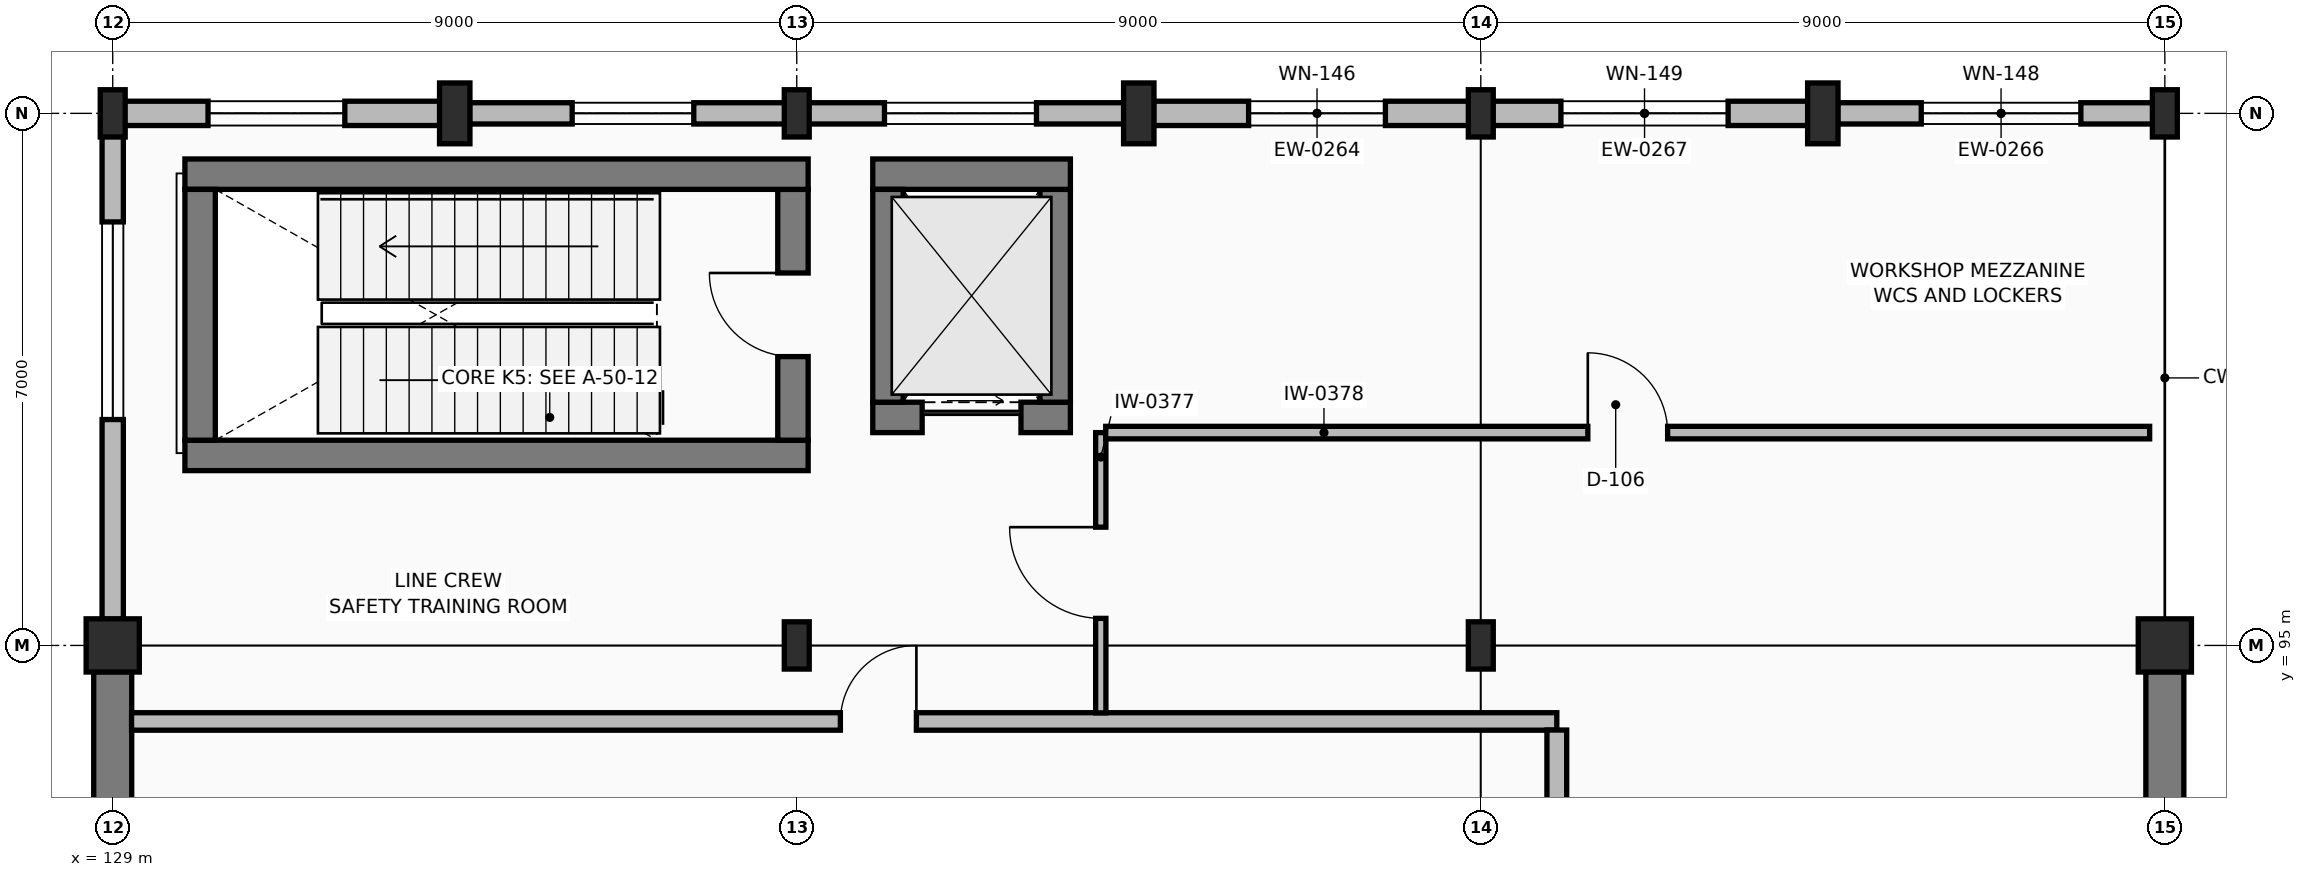
"""IFC4 building model, lengths in metres.
Left out: names, types, materials, properties, quantities, classifications, styles, units other than length and angle.
Written with IfcOpenShell. Run it as: python <this file> out.ifc"""

import sys

from ifc_helpers import new_model, si_unit, direction, frame, frame_2d, origin, origin_2d, place, context, subcontext, project, spatial, rectangle, i_section, extrude, element, fill, save


model = new_model("IFC4")
c1 = context("Model", 3, precision=1e-05, world=origin(), true_north=direction((0.0, 1.0)))
c2 = subcontext(c1, "Body", "Model", "MODEL_VIEW")
j1 = project(units=[si_unit("LENGTHUNIT", "METRE"), si_unit("PLANEANGLEUNIT", "RADIAN")], contexts=[c1])
p1 = place(None, origin())
s1 = spatial("IfcSite", under=j1, at=p1, CompositionType="ELEMENT")
p2 = place(p1, origin())
s2 = spatial("IfcBuilding", under=s1, at=p2, CompositionType="ELEMENT")
p3 = place(p2, frame((0.0, 0.0, 4.8)))
s3 = spatial("IfcBuildingStorey", under=s2, at=p3, CompositionType="ELEMENT", Elevation=4.8)
p4 = place(p3, frame((129.0, 95.0, 0.0), z_axis=(0.0, 0.0, 1.0), x_axis=(1.0, 0.0, 0.0)))
e1 = element("IfcColumn", 1, at=p4, inside=s3, PredefinedType="COLUMN", context=c2, shape_type="SweptSolid", body=[
    extrude(rectangle(XDim=0.7, YDim=0.7, at=origin_2d()), origin(), (0.0, 0.0, 1.0), 4.8),
])
for number, where, z_axis, x_axis in (
    (2, (129.0, 102.0, 0.0), (0.0, 0.0, 1.0), (1.0, 0.0, 0.0)),
    (3, (138.0, 95.0, 0.0), (0.0, 0.0, 1.0), (1.0, 0.0, 0.0)),
    (4, (138.0, 102.0, 0.0), (0.0, 0.0, 1.0), (1.0, 0.0, 0.0)),
    (5, (147.0, 95.0, 0.0), (0.0, 0.0, 1.0), (1.0, 0.0, 0.0)),
    (6, (147.0, 102.0, 0.0), (0.0, 0.0, 1.0), (1.0, 0.0, 0.0)),
):
    element("IfcColumn", number, at=place(p3, frame(where, z_axis=z_axis, x_axis=x_axis)), inside=s3, PredefinedType="COLUMN", context=c2, shape_type="SweptSolid", body=[
        extrude(i_section(OverallWidth=0.328, OverallDepth=0.622, WebThickness=0.015, FlangeThickness=0.024, at=origin_2d()), origin(), (0.0, 0.0, 1.0), 4.8),
    ])
p5 = place(p3, frame((156.0, 95.0, 0.0), z_axis=(0.0, 0.0, 1.0), x_axis=(1.0, 0.0, 0.0)))
e7 = element("IfcColumn", 7, at=p5, inside=s3, PredefinedType="COLUMN", context=c2, shape_type="SweptSolid", body=[
    extrude(rectangle(XDim=0.7, YDim=0.7, at=origin_2d()), origin(), (0.0, 0.0, 1.0), 4.8),
])
p6 = place(p3, frame((156.0, 102.0, 0.0), z_axis=(0.0, 0.0, 1.0), x_axis=(1.0, 0.0, 0.0)))
e8 = element("IfcColumn", 8, at=p6, inside=s3, PredefinedType="COLUMN", context=c2, shape_type="SweptSolid", body=[
    extrude(i_section(OverallWidth=0.328, OverallDepth=0.622, WebThickness=0.015, FlangeThickness=0.024, at=origin_2d()), origin(), (0.0, 0.0, 1.0), 4.8),
])
for number, where, z_axis, x_axis in (
    (9, (133.5, 102.0, 0.0), (0.0, 0.0, 1.0), (1.0, 0.0, 0.0)),
    (10, (142.5, 102.0, 0.0), (0.0, 0.0, 1.0), (1.0, 0.0, 0.0)),
    (11, (151.5, 102.0, 0.0), (0.0, 0.0, 1.0), (1.0, 0.0, 0.0)),
):
    element("IfcColumn", number, at=place(p3, frame(where, z_axis=z_axis, x_axis=x_axis)), inside=s3, PredefinedType="PILASTER", context=c2, shape_type="SweptSolid", body=[
        extrude(rectangle(XDim=0.4, YDim=0.8, at=origin_2d()), origin(), (0.0, 0.0, 1.0), 4.8),
    ])
p7 = place(p3, frame((156.0, 86.345, 0.0), z_axis=(0.0, 0.0, 1.0), x_axis=(0.0, 1.0, 0.0)))
e12 = element("IfcWall", 12, at=p7, inside=s3, PredefinedType="SHEAR", context=c2, shape_type="SweptSolid", body=[
    extrude(rectangle(XDim=8.31, YDim=0.5, at=frame_2d((4.155, 0.0))), origin(), (0.0, 0.0, 1.0), 3.708),
])
p8 = place(p3, frame((137.996, 102.0, 0.0), z_axis=(0.0, 0.0, 1.0), x_axis=(-1.0, 0.0, 0.0)))
e13 = element("IfcWall", 13, at=p8, inside=s3, PredefinedType="SOLIDWALL", context=c2, shape_type="SweptSolid", body=[
    extrude(rectangle(XDim=4.301, YDim=0.28, at=frame_2d((2.15, 0.0))), origin(), (0.0, 0.0, 1.0), 4.17),
])
p9 = place(p8, frame((1.351, 0.0, 0.9)))
e14 = element("IfcOpeningElement", 14, at=p9, cuts=e13, PredefinedType="OPENING", context=c2, shape_type="SweptSolid", body=[
    extrude(rectangle(XDim=1.6, YDim=1.55, at=frame_2d((0.8, 0.775))), frame((0.0, 0.15, 0.0), z_axis=(0.0, -1.0, 0.0), x_axis=(1.0, 0.0, 0.0)), (0.0, 0.0, 1.0), 0.3),
])
p10 = place(p3, frame((133.305, 102.0, 0.0), z_axis=(0.0, 0.0, 1.0), x_axis=(-1.0, 0.0, 0.0)))
e15 = element("IfcWall", 15, at=p10, inside=s3, PredefinedType="SOLIDWALL", context=c2, shape_type="SweptSolid", body=[
    extrude(rectangle(XDim=4.301, YDim=0.32, at=frame_2d((2.15, 0.0))), origin(), (0.0, 0.0, 1.0), 4.17),
])
p11 = place(p10, frame((1.251, 0.0, 0.9)))
e16 = element("IfcOpeningElement", 16, at=p11, cuts=e15, PredefinedType="OPENING", context=c2, shape_type="SweptSolid", body=[
    extrude(rectangle(XDim=1.8, YDim=1.5, at=frame_2d((0.9, 0.75))), frame((0.0, 0.17, 0.0), z_axis=(0.0, -1.0, 0.0), x_axis=(1.0, 0.0, 0.0)), (0.0, 0.0, 1.0), 0.34),
])
p12 = place(p3, frame((146.996, 102.0, 0.0), z_axis=(0.0, 0.0, 1.0), x_axis=(-1.0, 0.0, 0.0)))
e17 = element("IfcWall", 17, at=p12, inside=s3, PredefinedType="SOLIDWALL", context=c2, shape_type="SweptSolid", body=[
    extrude(rectangle(XDim=4.301, YDim=0.32, at=frame_2d((2.15, 0.0))), origin(), (0.0, 0.0, 1.0), 4.17),
])
p13 = place(p12, frame((1.251, 0.0, 0.9)))
e18 = element("IfcOpeningElement", 18, at=p13, cuts=e17, PredefinedType="OPENING", context=c2, shape_type="SweptSolid", body=[
    extrude(rectangle(XDim=1.8, YDim=1.6, at=frame_2d((0.9, 0.8))), frame((0.0, 0.17, 0.0), z_axis=(0.0, -1.0, 0.0), x_axis=(1.0, 0.0, 0.0)), (0.0, 0.0, 1.0), 0.34),
])
p14 = place(p3, frame((142.305, 102.0, 0.0), z_axis=(0.0, 0.0, 1.0), x_axis=(-1.0, 0.0, 0.0)))
e19 = element("IfcWall", 19, at=p14, inside=s3, PredefinedType="SOLIDWALL", context=c2, shape_type="SweptSolid", body=[
    extrude(rectangle(XDim=4.301, YDim=0.28, at=frame_2d((2.15, 0.0))), origin(), (0.0, 0.0, 1.0), 4.17),
])
p15 = place(p14, frame((1.151, 0.0, 0.9)))
e20 = element("IfcOpeningElement", 20, at=p15, cuts=e19, PredefinedType="OPENING", context=c2, shape_type="SweptSolid", body=[
    extrude(rectangle(XDim=2.0, YDim=1.5, at=frame_2d((1.0, 0.75))), frame((0.0, 0.15, 0.0), z_axis=(0.0, -1.0, 0.0), x_axis=(1.0, 0.0, 0.0)), (0.0, 0.0, 1.0), 0.3),
])
p16 = place(p3, frame((155.996, 102.0, 0.0), z_axis=(0.0, 0.0, 1.0), x_axis=(-1.0, 0.0, 0.0)))
e21 = element("IfcWall", 21, at=p16, inside=s3, PredefinedType="SOLIDWALL", context=c2, shape_type="SweptSolid", body=[
    extrude(rectangle(XDim=4.301, YDim=0.28, at=frame_2d((2.15, 0.0))), origin(), (0.0, 0.0, 1.0), 4.17),
])
p17 = place(p16, frame((1.101, 0.0, 0.9)))
e22 = element("IfcOpeningElement", 22, at=p17, cuts=e21, PredefinedType="OPENING", context=c2, shape_type="SweptSolid", body=[
    extrude(rectangle(XDim=2.1, YDim=1.55, at=frame_2d((1.05, 0.775))), frame((0.0, 0.15, 0.0), z_axis=(0.0, -1.0, 0.0), x_axis=(1.0, 0.0, 0.0)), (0.0, 0.0, 1.0), 0.3),
])
p18 = place(p3, frame((151.305, 102.0, 0.0), z_axis=(0.0, 0.0, 1.0), x_axis=(-1.0, 0.0, 0.0)))
e23 = element("IfcWall", 23, at=p18, inside=s3, PredefinedType="SOLIDWALL", context=c2, shape_type="SweptSolid", body=[
    extrude(rectangle(XDim=4.301, YDim=0.32, at=frame_2d((2.15, 0.0))), origin(), (0.0, 0.0, 1.0), 4.17),
])
p19 = place(p18, frame((1.051, 0.0, 0.9)))
e24 = element("IfcOpeningElement", 24, at=p19, cuts=e23, PredefinedType="OPENING", context=c2, shape_type="SweptSolid", body=[
    extrude(rectangle(XDim=2.2, YDim=1.4, at=frame_2d((1.1, 0.7))), frame((0.0, 0.17, 0.0), z_axis=(0.0, -1.0, 0.0), x_axis=(1.0, 0.0, 0.0)), (0.0, 0.0, 1.0), 0.34),
])
p20 = place(p3, frame((129.0, 94.655, 0.0), z_axis=(0.0, 0.0, 1.0), x_axis=(0.0, -1.0, 0.0)))
e25 = element("IfcWall", 25, at=p20, inside=s3, PredefinedType="SHEAR", context=c2, shape_type="SweptSolid", body=[
    extrude(rectangle(XDim=3.96, YDim=0.5, at=frame_2d((1.98, 0.0))), origin(), (0.0, 0.0, 1.0), 2.648),
])
p21 = place(p3, frame((129.0, 101.699, 0.0), z_axis=(0.0, 0.0, 1.0), x_axis=(0.0, -1.0, 0.0)))
e26 = element("IfcWall", 26, at=p21, inside=s3, PredefinedType="SOLIDWALL", context=c2, shape_type="SweptSolid", body=[
    extrude(rectangle(XDim=6.354, YDim=0.28, at=frame_2d((3.177, 0.0))), origin(), (0.0, 0.0, 1.0), 4.17),
])
p22 = place(p21, frame((1.127, 0.0, 0.9)))
e27 = element("IfcOpeningElement", 27, at=p22, cuts=e26, PredefinedType="OPENING", context=c2, shape_type="SweptSolid", body=[
    extrude(rectangle(XDim=2.6, YDim=1.55, at=frame_2d((1.3, 0.775))), frame((0.0, 0.15, 0.0), z_axis=(0.0, -1.0, 0.0), x_axis=(1.0, 0.0, 0.0)), (0.0, 0.0, 1.0), 0.3),
])
p23 = place(p3, frame((129.95, 97.5, 0.0), z_axis=(0.0, 0.0, 1.0), x_axis=(1.0, 0.0, 0.0)))
e28 = element("IfcWall", 28, at=p23, inside=s3, PredefinedType="SHEAR", context=c2, shape_type="SweptSolid", body=[
    extrude(rectangle(XDim=8.2, YDim=0.4, at=frame_2d((4.1, 0.0))), origin(), (0.0, 0.0, 1.0), 4.49),
])
p24 = place(p3, frame((137.95, 97.7, 0.0), z_axis=(0.0, 0.0, 1.0), x_axis=(0.0, 1.0, 0.0)))
e29 = element("IfcWall", 29, at=p24, inside=s3, PredefinedType="SHEAR", context=c2, shape_type="SweptSolid", body=[
    extrude(rectangle(XDim=3.3, YDim=0.4, at=frame_2d((1.65, 0.0))), origin(), (0.0, 0.0, 1.0), 4.49),
])
p25 = place(p24, frame((1.1, 0.0, 0.0)))
e30 = element("IfcOpeningElement", 30, at=p25, cuts=e29, PredefinedType="OPENING", context=c2, shape_type="SweptSolid", body=[
    extrude(rectangle(XDim=1.1, YDim=2.2, at=frame_2d((0.55, 1.1))), frame((0.0, 0.21, 0.0), z_axis=(0.0, -1.0, 0.0), x_axis=(1.0, 0.0, 0.0)), (0.0, 0.0, 1.0), 0.42),
])
p26 = place(p3, frame((138.15, 101.2, 0.0), z_axis=(0.0, 0.0, 1.0), x_axis=(-1.0, 0.0, 0.0)))
e31 = element("IfcWall", 31, at=p26, inside=s3, PredefinedType="SHEAR", context=c2, shape_type="SweptSolid", body=[
    extrude(rectangle(XDim=8.2, YDim=0.4, at=frame_2d((4.1, 0.0))), origin(), (0.0, 0.0, 1.0), 4.49),
])
p27 = place(p3, frame((130.15, 101.0, 0.0), z_axis=(0.0, 0.0, 1.0), x_axis=(0.0, -1.0, 0.0)))
e32 = element("IfcWall", 32, at=p27, inside=s3, PredefinedType="SHEAR", context=c2, shape_type="SweptSolid", body=[
    extrude(rectangle(XDim=3.3, YDim=0.4, at=frame_2d((1.65, 0.0))), origin(), (0.0, 0.0, 1.0), 4.49),
])
p28 = place(p3, frame((139.0, 98.0, 0.0), z_axis=(0.0, 0.0, 1.0), x_axis=(1.0, 0.0, 0.0)))
e33 = element("IfcWall", 33, at=p28, inside=s3, PredefinedType="SHEAR", context=c2, shape_type="SweptSolid", body=[
    extrude(rectangle(XDim=2.6, YDim=0.4, at=frame_2d((1.3, 0.0))), origin(), (0.0, 0.0, 1.0), 4.49),
])
p29 = place(p28, frame((0.65, 0.0, 0.0)))
e34 = element("IfcOpeningElement", 34, at=p29, cuts=e33, PredefinedType="OPENING", context=c2, shape_type="SweptSolid", body=[
    extrude(rectangle(XDim=1.3, YDim=2.25, at=frame_2d((0.65, 1.125))), frame((0.0, 0.21, 0.0), z_axis=(0.0, -1.0, 0.0), x_axis=(1.0, 0.0, 0.0)), (0.0, 0.0, 1.0), 0.42),
])
p30 = place(p3, frame((141.4, 98.2, 0.0), z_axis=(0.0, 0.0, 1.0), x_axis=(0.0, 1.0, 0.0)))
e35 = element("IfcWall", 35, at=p30, inside=s3, PredefinedType="SHEAR", context=c2, shape_type="SweptSolid", body=[
    extrude(rectangle(XDim=2.8, YDim=0.4, at=frame_2d((1.4, 0.0))), origin(), (0.0, 0.0, 1.0), 4.49),
])
p31 = place(p3, frame((141.6, 101.2, 0.0), z_axis=(0.0, 0.0, 1.0), x_axis=(-1.0, 0.0, 0.0)))
e36 = element("IfcWall", 36, at=p31, inside=s3, PredefinedType="SHEAR", context=c2, shape_type="SweptSolid", body=[
    extrude(rectangle(XDim=2.6, YDim=0.4, at=frame_2d((1.3, 0.0))), origin(), (0.0, 0.0, 1.0), 4.49),
])
p32 = place(p3, frame((139.2, 101.0, 0.0), z_axis=(0.0, 0.0, 1.0), x_axis=(0.0, -1.0, 0.0)))
e37 = element("IfcWall", 37, at=p32, inside=s3, PredefinedType="SHEAR", context=c2, shape_type="SweptSolid", body=[
    extrude(rectangle(XDim=2.8, YDim=0.4, at=frame_2d((1.4, 0.0))), origin(), (0.0, 0.0, 1.0), 4.49),
])
p33 = place(p3, frame((129.248, 94.0, 0.0), z_axis=(0.0, 0.0, 1.0), x_axis=(1.0, 0.0, 0.0)))
e38 = element("IfcWall", 38, at=p33, inside=s3, PredefinedType="PARTITIONING", context=c2, shape_type="SweptSolid", body=[
    extrude(rectangle(XDim=18.752, YDim=0.23, at=frame_2d((9.376, 0.0))), origin(), (0.0, 0.0, 1.0), 3.698),
])
p34 = place(p33, frame((9.326, 0.0, 0.0)))
e39 = element("IfcOpeningElement", 39, at=p34, cuts=e38, PredefinedType="OPENING", context=c2, shape_type="SweptSolid", body=[
    extrude(rectangle(XDim=1.0, YDim=2.15, at=frame_2d((0.5, 1.075))), frame((0.0, 0.125, 0.0), z_axis=(0.0, -1.0, 0.0), x_axis=(1.0, 0.0, 0.0)), (0.0, 0.0, 1.0), 0.25),
])
p35 = place(p3, frame((148.0, 77.2, 0.0), z_axis=(0.0, 0.0, 1.0), x_axis=(0.0, 1.0, 0.0)))
e40 = element("IfcWall", 40, at=p35, inside=s3, PredefinedType="PARTITIONING", context=c2, shape_type="SweptSolid", body=[
    extrude(rectangle(XDim=16.687, YDim=0.26, at=frame_2d((8.344, 0.0))), origin(), (0.0, 0.0, 1.0), 3.698),
])
p36 = place(p35, frame((7.393, 0.0, 0.0)))
e41 = element("IfcOpeningElement", 41, at=p36, cuts=e40, PredefinedType="OPENING", context=c2, shape_type="SweptSolid", body=[
    extrude(rectangle(XDim=1.0, YDim=2.15, at=frame_2d((0.5, 1.075))), frame((0.0, 0.14, 0.0), z_axis=(0.0, -1.0, 0.0), x_axis=(1.0, 0.0, 0.0)), (0.0, 0.0, 1.0), 0.28),
])
p37 = place(p3, frame((142.0, 94.113, 0.0), z_axis=(0.0, 0.0, 1.0), x_axis=(0.0, 1.0, 0.0)))
e42 = element("IfcWall", 42, at=p37, inside=s3, PredefinedType="PARTITIONING", context=c2, shape_type="SweptSolid", body=[
    extrude(rectangle(XDim=3.687, YDim=0.135, at=frame_2d((1.844, 0.0))), origin(), (0.0, 0.0, 1.0), 3.698),
])
p38 = place(p37, frame((1.243, 0.0, 0.0)))
e43 = element("IfcOpeningElement", 43, at=p38, cuts=e42, PredefinedType="OPENING", context=c2, shape_type="SweptSolid", body=[
    extrude(rectangle(XDim=1.2, YDim=2.2, at=frame_2d((0.6, 1.1))), frame((0.0, 0.077, 0.0), z_axis=(0.0, -1.0, 0.0), x_axis=(1.0, 0.0, 0.0)), (0.0, 0.0, 1.0), 0.155),
])
p39 = place(p3, frame((142.065, 97.8, 0.0), z_axis=(0.0, 0.0, 1.0), x_axis=(1.0, 0.0, 0.0)))
e44 = element("IfcWall", 44, at=p39, inside=s3, PredefinedType="PARTITIONING", context=c2, shape_type="SweptSolid", body=[
    extrude(rectangle(XDim=13.735, YDim=0.165, at=frame_2d((6.868, 0.0))), origin(), (0.0, 0.0, 1.0), 3.698),
])
p40 = place(p39, frame((6.343, 0.0, 0.0)))
e45 = element("IfcOpeningElement", 45, at=p40, cuts=e44, PredefinedType="OPENING", context=c2, shape_type="SweptSolid", body=[
    extrude(rectangle(XDim=1.05, YDim=2.15, at=frame_2d((0.525, 1.075))), frame((0.0, 0.093, 0.0), z_axis=(0.0, -1.0, 0.0), x_axis=(1.0, 0.0, 0.0)), (0.0, 0.0, 1.0), 0.185),
])
p41 = place(p9, origin())
e46 = element("IfcWindow", 46, at=p41, inside=s3, PartitioningType="SINGLE_PANEL", PredefinedType="WINDOW", context=c2, shape_type="SweptSolid", body=[
    extrude(rectangle(XDim=1.6, YDim=1.55, at=frame_2d((0.8, 0.775))), frame((0.0, 0.03, 0.0), z_axis=(0.0, -1.0, 0.0), x_axis=(1.0, 0.0, 0.0)), (0.0, 0.0, 1.0), 0.06),
])
fill(e14, e46)
p42 = place(p11, origin())
e47 = element("IfcWindow", 47, at=p42, inside=s3, PartitioningType="SINGLE_PANEL", PredefinedType="WINDOW", context=c2, shape_type="SweptSolid", body=[
    extrude(rectangle(XDim=1.8, YDim=1.5, at=frame_2d((0.9, 0.75))), frame((0.0, 0.03, 0.0), z_axis=(0.0, -1.0, 0.0), x_axis=(1.0, 0.0, 0.0)), (0.0, 0.0, 1.0), 0.06),
])
fill(e16, e47)
p43 = place(p13, origin())
e48 = element("IfcWindow", 48, at=p43, inside=s3, PartitioningType="SINGLE_PANEL", PredefinedType="WINDOW", context=c2, shape_type="SweptSolid", body=[
    extrude(rectangle(XDim=1.8, YDim=1.6, at=frame_2d((0.9, 0.8))), frame((0.0, 0.03, 0.0), z_axis=(0.0, -1.0, 0.0), x_axis=(1.0, 0.0, 0.0)), (0.0, 0.0, 1.0), 0.06),
])
fill(e18, e48)
p44 = place(p15, origin())
e49 = element("IfcWindow", 49, at=p44, inside=s3, PartitioningType="SINGLE_PANEL", PredefinedType="WINDOW", context=c2, shape_type="SweptSolid", body=[
    extrude(rectangle(XDim=2.0, YDim=1.5, at=frame_2d((1.0, 0.75))), frame((0.0, 0.03, 0.0), z_axis=(0.0, -1.0, 0.0), x_axis=(1.0, 0.0, 0.0)), (0.0, 0.0, 1.0), 0.06),
])
fill(e20, e49)
p45 = place(p17, origin())
e50 = element("IfcWindow", 50, at=p45, inside=s3, PartitioningType="SINGLE_PANEL", PredefinedType="WINDOW", context=c2, shape_type="SweptSolid", body=[
    extrude(rectangle(XDim=2.1, YDim=1.55, at=frame_2d((1.05, 0.775))), frame((0.0, 0.03, 0.0), z_axis=(0.0, -1.0, 0.0), x_axis=(1.0, 0.0, 0.0)), (0.0, 0.0, 1.0), 0.06),
])
fill(e22, e50)
p46 = place(p19, origin())
e51 = element("IfcWindow", 51, at=p46, inside=s3, PartitioningType="SINGLE_PANEL", PredefinedType="WINDOW", context=c2, shape_type="SweptSolid", body=[
    extrude(rectangle(XDim=2.2, YDim=1.4, at=frame_2d((1.1, 0.7))), frame((0.0, 0.03, 0.0), z_axis=(0.0, -1.0, 0.0), x_axis=(1.0, 0.0, 0.0)), (0.0, 0.0, 1.0), 0.06),
])
fill(e24, e51)
p47 = place(p22, origin())
e52 = element("IfcWindow", 52, at=p47, inside=s3, PartitioningType="SINGLE_PANEL", PredefinedType="WINDOW", context=c2, shape_type="SweptSolid", body=[
    extrude(rectangle(XDim=2.6, YDim=1.55, at=frame_2d((1.3, 0.775))), frame((0.0, 0.03, 0.0), z_axis=(0.0, -1.0, 0.0), x_axis=(1.0, 0.0, 0.0)), (0.0, 0.0, 1.0), 0.06),
])
fill(e27, e52)
p48 = place(p25, origin())
e53 = element("IfcDoor", 53, at=p48, inside=s3, OperationType="SINGLE_SWING_RIGHT", PredefinedType="DOOR", context=c2, shape_type="SweptSolid", body=[
    extrude(rectangle(XDim=1.1, YDim=2.2, at=frame_2d((0.55, 1.1))), frame((0.0, 0.025, 0.0), z_axis=(0.0, -1.0, 0.0), x_axis=(1.0, 0.0, 0.0)), (0.0, 0.0, 1.0), 0.05),
])
fill(e30, e53)
p49 = place(p29, origin())
e54 = element("IfcDoor", 54, at=p49, inside=s3, OperationType="SLIDING_TO_RIGHT", PredefinedType="DOOR", context=c2, shape_type="SweptSolid", body=[
    extrude(rectangle(XDim=1.3, YDim=2.25, at=frame_2d((0.65, 1.125))), frame((0.0, 0.025, 0.0), z_axis=(0.0, -1.0, 0.0), x_axis=(1.0, 0.0, 0.0)), (0.0, 0.0, 1.0), 0.05),
])
fill(e34, e54)
p50 = place(p34, origin())
e55 = element("IfcDoor", 55, at=p50, inside=s3, OperationType="SINGLE_SWING_RIGHT", PredefinedType="DOOR", context=c2, shape_type="SweptSolid", body=[
    extrude(rectangle(XDim=1.0, YDim=2.15, at=frame_2d((0.5, 1.075))), frame((0.0, 0.025, 0.0), z_axis=(0.0, -1.0, 0.0), x_axis=(1.0, 0.0, 0.0)), (0.0, 0.0, 1.0), 0.05),
])
fill(e39, e55)
p51 = place(p38, origin())
e56 = element("IfcDoor", 56, at=p51, inside=s3, OperationType="SINGLE_SWING_RIGHT", PredefinedType="DOOR", context=c2, shape_type="SweptSolid", body=[
    extrude(rectangle(XDim=1.2, YDim=2.2, at=frame_2d((0.6, 1.1))), frame((0.0, 0.025, 0.0), z_axis=(0.0, -1.0, 0.0), x_axis=(1.0, 0.0, 0.0)), (0.0, 0.0, 1.0), 0.05),
])
fill(e43, e56)
p52 = place(p40, origin())
e57 = element("IfcDoor", 57, at=p52, inside=s3, OperationType="SINGLE_SWING_LEFT", PredefinedType="DOOR", context=c2, shape_type="SweptSolid", body=[
    extrude(rectangle(XDim=1.05, YDim=2.15, at=frame_2d((0.525, 1.075))), frame((0.0, 0.025, 0.0), z_axis=(0.0, -1.0, 0.0), x_axis=(1.0, 0.0, 0.0)), (0.0, 0.0, 1.0), 0.05),
])
fill(e45, e57)
save(model, sys.argv[1])
